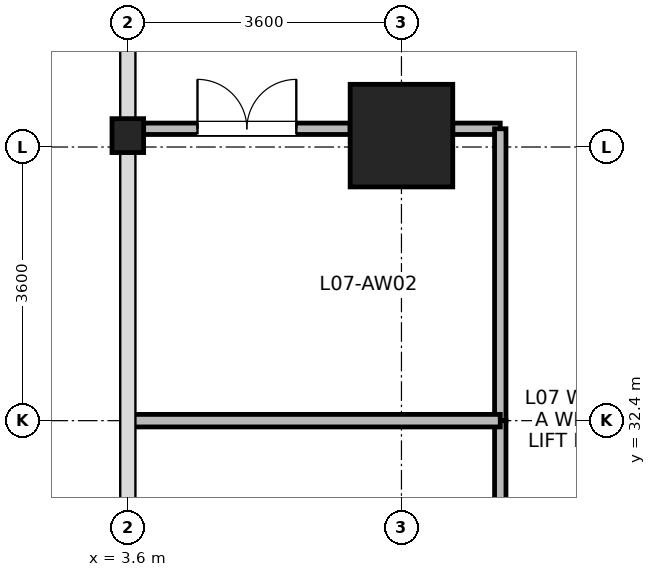
"""IFC4 building model, lengths in metres.
Left out: names, types, materials, properties, quantities, classifications, styles, units other than length and angle.
Written with IfcOpenShell. Run it as: python <this file> out.ifc"""

import sys

from ifc_helpers import new_model, si_unit, direction, frame, frame_2d, origin, origin_2d, place, context, subcontext, project, spatial, rectangle, i_section, extrude, source, transform, mapped, element, fill, save


model = new_model("IFC4")
c1 = context("Model", 3, precision=1e-05, world=origin(), true_north=direction((0.0, 1.0)))
c2 = subcontext(c1, "Body", "Model", "MODEL_VIEW")
j1 = project(units=[si_unit("LENGTHUNIT", "METRE"), si_unit("PLANEANGLEUNIT", "RADIAN")], contexts=[c1])
p1 = place(None, origin())
s1 = spatial("IfcSite", under=j1, at=p1, CompositionType="ELEMENT")
p2 = place(p1, origin())
s2 = spatial("IfcBuilding", under=s1, at=p2, CompositionType="ELEMENT")
p3 = place(p2, frame((0.0, 0.0, 32.7)))
s3 = spatial("IfcBuildingStorey", under=s2, at=p3, CompositionType="ELEMENT", Elevation=32.7)
m1 = source(origin(), c2, "Body", "SweptSolid", [
    extrude(rectangle(XDim=1.35, YDim=1.35, at=origin_2d()), origin(), (0.0, 0.0, 1.0), 3.7),
])
p4 = place(p3, frame((7.2, 36.15, 0.0), z_axis=(0.0, 0.0, 1.0), x_axis=(1.0, 0.0, 0.0)))
e1 = element("IfcColumn", 1, at=p4, inside=s3, PredefinedType="COLUMN", context=c2, shape_type="MappedRepresentation", body=[
    mapped(m1, transform((0.0, 0.0, 0.0), x_axis=(1.0, 0.0, 0.0), y_axis=(0.0, 1.0, 0.0), z_axis=(0.0, 0.0, 1.0), scale=1.0)),
])
m2 = source(origin(), c2, "Body", "SweptSolid", [
    extrude(i_section(OverallWidth=0.416, OverallDepth=0.446, WebThickness=0.029, FlangeThickness=0.04, FilletRadius=0.015, at=origin_2d()), origin(), (0.0, 0.0, 1.0), 3.7),
])
p5 = place(p3, frame((3.6, 36.15, 0.0), z_axis=(0.0, 0.0, 1.0), x_axis=(1.0, 0.0, 0.0)))
e2 = element("IfcColumn", 2, at=p5, inside=s3, PredefinedType="COLUMN", context=c2, shape_type="MappedRepresentation", body=[
    mapped(m2, transform((0.0, 0.0, 0.0), x_axis=(1.0, 0.0, 0.0), y_axis=(0.0, 1.0, 0.0), z_axis=(0.0, 0.0, 1.0), scale=1.0)),
])
p6 = place(p3, frame((3.808, 36.24, 0.0), z_axis=(0.0, 0.0, 1.0), x_axis=(1.0, 0.0, 0.0)))
e3 = element("IfcWall", 3, at=p6, inside=s3, PredefinedType="PARTITIONING", context=c2, shape_type="SweptSolid", body=[
    extrude(rectangle(XDim=2.717, YDim=0.15, at=frame_2d((1.358, 0.0))), origin(), (0.0, 0.0, 1.0), 2.78),
])
p7 = place(p6, frame((0.708, 0.0, 0.0)))
e4 = element("IfcOpeningElement", 4, at=p7, cuts=e3, PredefinedType="OPENING", context=c2, shape_type="SweptSolid", body=[
    extrude(rectangle(XDim=1.3, YDim=2.12, at=frame_2d((0.65, 1.06))), frame((0.0, 0.085, 0.0), z_axis=(0.0, -1.0, 0.0), x_axis=(1.0, 0.0, 0.0)), (0.0, 0.0, 1.0), 0.17),
])
p8 = place(p3, frame((7.875, 36.24, 0.0), z_axis=(0.0, 0.0, 1.0), x_axis=(1.0, 0.0, 0.0)))
e5 = element("IfcWall", 5, at=p8, inside=s3, PredefinedType="PARTITIONING", context=c2, shape_type="SweptSolid", body=[
    extrude(rectangle(XDim=0.625, YDim=0.15, at=frame_2d((0.312, 0.0))), origin(), (0.0, 0.0, 1.0), 2.78),
])
p9 = place(p3, frame((8.5, 32.4, 0.0), z_axis=(0.0, 0.0, 1.0), x_axis=(0.0, 1.0, 0.0)))
e6 = element("IfcWall", 6, at=p9, inside=s3, PredefinedType="PARTITIONING", context=c2, shape_type="SweptSolid", body=[
    extrude(rectangle(XDim=3.84, YDim=0.15, at=frame_2d((1.92, 0.0))), origin(), (0.0, 0.0, 1.0), 3.43),
])
p10 = place(p3, frame((8.5, 28.56, 0.0), z_axis=(0.0, 0.0, 1.0), x_axis=(0.0, 1.0, 0.0)))
e7 = element("IfcWall", 7, at=p10, inside=s3, PredefinedType="PARTITIONING", context=c2, shape_type="SweptSolid", body=[
    extrude(rectangle(XDim=3.84, YDim=0.15, at=frame_2d((1.92, 0.0))), origin(), (0.0, 0.0, 1.0), 3.43),
])
p11 = place(p3, frame((3.62, 32.4, 0.0), z_axis=(0.0, 0.0, 1.0), x_axis=(1.0, 0.0, 0.0)))
e8 = element("IfcWall", 8, at=p11, inside=s3, PredefinedType="PARTITIONING", context=c2, shape_type="SweptSolid", body=[
    extrude(rectangle(XDim=4.88, YDim=0.165, at=frame_2d((2.44, 0.0))), origin(), (0.0, 0.0, 1.0), 3.43),
])
p12 = place(p7, origin())
e9 = element("IfcDoor", 9, at=p12, inside=s3, OperationType="DOUBLE_DOOR_SINGLE_SWING", PredefinedType="DOOR", context=c2, shape_type="SweptSolid", body=[
    extrude(rectangle(XDim=1.3, YDim=2.12, at=frame_2d((0.65, 1.06))), frame((0.0, 0.025, 0.0), z_axis=(0.0, -1.0, 0.0), x_axis=(1.0, 0.0, 0.0)), (0.0, 0.0, 1.0), 0.05),
])
fill(e4, e9)
save(model, sys.argv[1])
